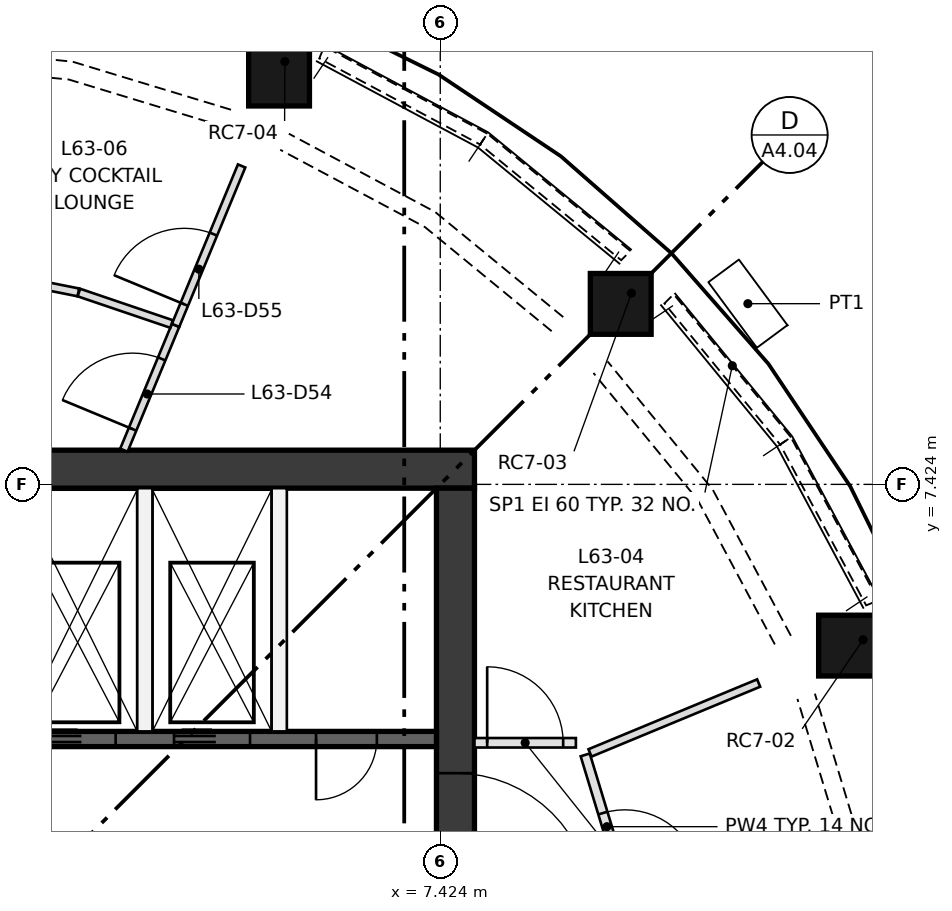
"""IFC4 building model, lengths in metres.
Left out: names, types, materials, properties, quantities, classifications, styles, units other than length and angle.
Written with IfcOpenShell. Run it as: python <this file> out.ifc"""

import sys

from ifc_helpers import new_model, si_unit, direction, frame, frame_2d, origin, origin_2d, place, context, subcontext, project, spatial, polyline, rectangle, outline, extrude, element, fill, save


model = new_model("IFC4")
c1 = context("Model", 3, precision=1e-05, world=origin(), true_north=direction((0.0, 1.0)))
c2 = subcontext(c1, "Body", "Model", "MODEL_VIEW")
j1 = project(units=[si_unit("LENGTHUNIT", "METRE"), si_unit("PLANEANGLEUNIT", "RADIAN")], contexts=[c1])
p1 = place(None, origin())
s1 = spatial("IfcSite", under=j1, at=p1, CompositionType="ELEMENT")
p2 = place(p1, origin())
s2 = spatial("IfcBuilding", under=s1, at=p2, CompositionType="ELEMENT")
p3 = place(p2, frame((0.0, 0.0, 231.2)))
s3 = spatial("IfcBuildingStorey", under=s2, at=p3, CompositionType="ELEMENT", Elevation=231.2)
p4 = place(p3, frame((12.987, 5.379, 0.5), z_axis=(0.0, 0.0, 1.0), x_axis=(0.382642651649, -0.923896423382, 0.0)))
e1 = element("IfcColumn", 1, at=p4, inside=s3, PredefinedType="COLUMN", context=c2, shape_type="SweptSolid", body=[
    extrude(rectangle(XDim=0.8, YDim=0.8, at=origin_2d()), origin(), (0.0, -0.275, 0.962), 3.328),
])
p5 = place(p3, frame((9.94, 9.94, 0.5), z_axis=(0.0, 0.0, 1.0), x_axis=(0.707106781187, -0.707106781187, 0.0)))
e2 = element("IfcColumn", 2, at=p5, inside=s3, PredefinedType="COLUMN", context=c2, shape_type="SweptSolid", body=[
    extrude(rectangle(XDim=0.8, YDim=0.8, at=origin_2d()), origin(), (0.0, -0.275, 0.962), 3.328),
])
p6 = place(p3, frame((5.379, 12.987, 0.5), z_axis=(0.0, 0.0, 1.0), x_axis=(0.923896423382, -0.382642651649, 0.0)))
e3 = element("IfcColumn", 3, at=p6, inside=s3, PredefinedType="COLUMN", context=c2, shape_type="SweptSolid", body=[
    extrude(rectangle(XDim=0.8, YDim=0.8, at=origin_2d()), origin(), (0.0, -0.275, 0.962), 3.328),
])
p7 = place(p3, frame((-7.874, 7.624, 0.0), z_axis=(0.0, 0.0, 1.0), x_axis=(1.0, 0.0, 0.0)))
e4 = element("IfcWall", 4, at=p7, inside=s3, PredefinedType="SHEAR", context=c2, shape_type="SweptSolid", body=[
    extrude(rectangle(XDim=15.748, YDim=0.5, at=frame_2d((7.874, 0.0))), origin(), (0.0, 0.0, 1.0), 3.3),
])
p8 = place(p3, frame((7.624, -7.374, 0.0), z_axis=(0.0, 0.0, 1.0), x_axis=(0.0, 1.0, 0.0)))
e5 = element("IfcWall", 5, at=p8, inside=s3, PredefinedType="SHEAR", context=c2, shape_type="SweptSolid", body=[
    extrude(rectangle(XDim=14.748, YDim=0.5, at=frame_2d((7.374, 0.0))), origin(), (0.0, 0.0, 1.0), 3.3),
])
p9 = place(p8, frame((6.874, 0.0, 0.0)))
e6 = element("IfcOpeningElement", 6, at=p9, cuts=e5, PredefinedType="OPENING", context=c2, shape_type="SweptSolid", body=[
    extrude(rectangle(XDim=1.0, YDim=2.1, at=frame_2d((0.5, 1.05))), frame((0.0, 0.26, 0.0), z_axis=(0.0, -1.0, 0.0), x_axis=(1.0, 0.0, 0.0)), (0.0, 0.0, 1.0), 0.52),
])
p10 = place(p8, frame((3.75, 0.0, 0.0)))
e7 = element("IfcOpeningElement", 7, at=p10, cuts=e5, PredefinedType="OPENING", context=c2, shape_type="SweptSolid", body=[
    extrude(rectangle(XDim=1.8, YDim=2.1, at=frame_2d((0.9, 1.05))), frame((0.0, 0.26, 0.0), z_axis=(0.0, -1.0, 0.0), x_axis=(1.0, 0.0, 0.0)), (0.0, 0.0, 1.0), 0.52),
])
p11 = place(p8, frame((9.198, 0.0, 0.0)))
e8 = element("IfcOpeningElement", 8, at=p11, cuts=e5, PredefinedType="OPENING", context=c2, shape_type="SweptSolid", body=[
    extrude(rectangle(XDim=1.8, YDim=2.1, at=frame_2d((0.9, 1.05))), frame((0.0, 0.26, 0.0), z_axis=(0.0, -1.0, 0.0), x_axis=(1.0, 0.0, 0.0)), (0.0, 0.0, 1.0), 0.52),
])
p12 = place(p3, frame((0.0, 4.074, 0.0), z_axis=(0.0, 0.0, 1.0), x_axis=(1.0, 0.0, 0.0)))
e9 = element("IfcWall", 9, at=p12, inside=s3, PredefinedType="SHEAR", context=c2, shape_type="SweptSolid", body=[
    extrude(rectangle(XDim=7.374, YDim=0.2, at=frame_2d((3.687, 0.0))), origin(), (0.0, 0.0, 1.0), 3.3),
])
p13 = place(p12, frame((0.384, 0.0, 0.0)))
e10 = element("IfcOpeningElement", 10, at=p13, cuts=e9, PredefinedType="OPENING", context=c2, shape_type="SweptSolid", body=[
    extrude(rectangle(XDim=1.0, YDim=2.1, at=frame_2d((0.5, 1.05))), frame((0.0, 0.11, 0.0), z_axis=(0.0, -1.0, 0.0), x_axis=(1.0, 0.0, 0.0)), (0.0, 0.0, 1.0), 0.22),
])
p14 = place(p12, frame((2.153, 0.0, 0.0)))
e11 = element("IfcOpeningElement", 11, at=p14, cuts=e9, PredefinedType="OPENING", context=c2, shape_type="SweptSolid", body=[
    extrude(rectangle(XDim=1.0, YDim=2.1, at=frame_2d((0.5, 1.05))), frame((0.0, 0.11, 0.0), z_axis=(0.0, -1.0, 0.0), x_axis=(1.0, 0.0, 0.0)), (0.0, 0.0, 1.0), 0.22),
])
p15 = place(p12, frame((3.921, 0.0, 0.0)))
e12 = element("IfcOpeningElement", 12, at=p15, cuts=e9, PredefinedType="OPENING", context=c2, shape_type="SweptSolid", body=[
    extrude(rectangle(XDim=1.0, YDim=2.1, at=frame_2d((0.5, 1.05))), frame((0.0, 0.11, 0.0), z_axis=(0.0, -1.0, 0.0), x_axis=(1.0, 0.0, 0.0)), (0.0, 0.0, 1.0), 0.22),
])
p16 = place(p12, frame((5.79, 0.0, 0.0)))
e13 = element("IfcOpeningElement", 13, at=p16, cuts=e9, PredefinedType="OPENING", context=c2, shape_type="SweptSolid", body=[
    extrude(rectangle(XDim=0.8, YDim=2.1, at=frame_2d((0.4, 1.05))), frame((0.0, 0.11, 0.0), z_axis=(0.0, -1.0, 0.0), x_axis=(1.0, 0.0, 0.0)), (0.0, 0.0, 1.0), 0.22),
])
for number, where, z_axis, x_axis in (
    (14, (3.537, 4.174, 0.0), (0.0, 0.0, 1.0), (0.0, 1.0, 0.0)),
    (15, (5.305, 4.174, 0.0), (0.0, 0.0, 1.0), (0.0, 1.0, 0.0)),
):
    element("IfcWall", number, at=place(p3, frame(where, z_axis=z_axis, x_axis=x_axis)), inside=s3, PredefinedType="PARTITIONING", context=c2, shape_type="SweptSolid", body=[
        extrude(rectangle(XDim=3.2, YDim=0.2, at=frame_2d((1.6, 0.0))), origin(), (0.0, 0.0, 1.0), 3.3),
    ])
p17 = place(p3, frame((14.2, 2.824, 0.0), z_axis=(0.894721380135, 0.271074750296, 0.354953703573), x_axis=(-0.289959608839, 0.957038883806, 1.1226683e-05)))
e16 = element("IfcWall", 16, at=p17, inside=s3, PredefinedType="SOLIDWALL", context=c2, shape_type="SweptSolid", body=[
    extrude(outline(polyline([(0.0, 0.0), (2.434, -5.551e-17), (2.417, 0.481), (0.017, 0.481), (0.0, 0.0)])), origin(), (0.0, 0.0, -1.0), 0.3),
])
p18 = place(p3, frame((13.186, 5.898, 0.0), z_axis=(0.824332600798, 0.441016524886, 0.35493687895), x_axis=(-0.471734377661, 0.881740708382, 1.0715603e-05)))
e17 = element("IfcWall", 17, at=p18, inside=s3, PredefinedType="SOLIDWALL", context=c2, shape_type="SweptSolid", body=[
    extrude(outline(polyline([(0.0, 0.0), (2.434, 0.0), (2.417, 0.481), (0.017, 0.481), (0.0, 0.0)])), origin(), (0.0, 0.0, -1.0), 0.3),
])
p19 = place(p3, frame((12.038, 8.044, 0.0), z_axis=(0.722862546463, 0.59284076781, 0.354978257002), x_axis=(-0.634136527431, 0.773221096766, -9.701072e-06)))
e18 = element("IfcWall", 18, at=p19, inside=s3, PredefinedType="SOLIDWALL", context=c2, shape_type="SweptSolid", body=[
    extrude(outline(polyline([(0.0, 0.0), (2.434, 5.551e-17), (2.417, 0.481), (0.017, 0.481), (0.0, 0.0)])), origin(), (0.0, 0.0, -1.0), 0.3),
])
p20 = place(p3, frame((9.926, 10.495, 0.0), z_axis=(0.59284076781, 0.722862546463, 0.354978257002), x_axis=(-0.773221096766, 0.634136527431, 9.701072e-06)))
e19 = element("IfcWall", 19, at=p20, inside=s3, PredefinedType="SOLIDWALL", context=c2, shape_type="SweptSolid", body=[
    extrude(outline(polyline([(0.0, 0.0), (2.434, -5.551e-17), (2.417, 0.481), (0.017, 0.481), (0.0, 0.0)])), origin(), (0.0, 0.0, -1.0), 0.3),
])
p21 = place(p3, frame((8.044, 12.038, 0.0), z_axis=(0.441126603603, 0.824402860411, 0.354636776631), x_axis=(-0.881712517728, 0.471787066311, 1.195964e-05)))
e20 = element("IfcWall", 20, at=p21, inside=s3, PredefinedType="SOLIDWALL", context=c2, shape_type="SweptSolid", body=[
    extrude(outline(polyline([(0.0, 0.0), (2.434, 5.551e-17), (2.417, 0.481), (0.017, 0.481), (0.0, 0.0)])), origin(), (0.0, 0.0, -1.0), 0.3),
])
p22 = place(p3, frame((5.154, 13.494, 0.0), z_axis=(0.271094631402, 0.894631168658, 0.355165838574), x_axis=(-0.957026634075, 0.290000037325, 4.815507e-06)))
e21 = element("IfcWall", 21, at=p22, inside=s3, PredefinedType="SOLIDWALL", context=c2, shape_type="SweptSolid", body=[
    extrude(outline(polyline([(0.0, 0.0), (2.434, 0.0), (2.417, 0.481), (0.017, 0.481), (0.0, 0.0)])), origin(), (0.0, 0.0, -1.0), 0.3),
])
p23 = place(p3, frame((9.331, 3.865, 0.0), z_axis=(0.0, 0.0, 1.0), x_axis=(0.290206520171, -0.956964040939, 0.0)))
e22 = element("IfcWall", 22, at=p23, inside=s3, PredefinedType="PARTITIONING", context=c2, shape_type="SweptSolid", body=[
    extrude(rectangle(XDim=1.974, YDim=0.125, at=frame_2d((0.987, 0.0))), origin(), (0.0, 0.0, 1.0), 3.3),
])
p24 = place(p23, frame((0.8, 0.0, 0.0)))
e23 = element("IfcOpeningElement", 23, at=p24, cuts=e22, PredefinedType="OPENING", context=c2, shape_type="SweptSolid", body=[
    extrude(rectangle(XDim=1.0, YDim=2.1, at=frame_2d((0.5, 1.05))), frame((0.0, 0.073, 0.0), z_axis=(0.0, -1.0, 0.0), x_axis=(1.0, 0.0, 0.0)), (0.0, 0.0, 1.0), 0.145),
])
p25 = place(p3, frame((7.874, 4.024, 0.0), z_axis=(0.0, 0.0, 1.0), x_axis=(1.0, 0.0, 0.0)))
e24 = element("IfcWall", 24, at=p25, inside=s3, PredefinedType="PARTITIONING", context=c2, shape_type="SweptSolid", body=[
    extrude(rectangle(XDim=1.334, YDim=0.125, at=frame_2d((0.667, 0.0))), origin(), (0.0, 0.0, 1.0), 3.3),
])
p26 = place(p25, frame((0.167, 0.0, 0.0)))
e25 = element("IfcOpeningElement", 25, at=p26, cuts=e24, PredefinedType="OPENING", context=c2, shape_type="SweptSolid", body=[
    extrude(rectangle(XDim=1.0, YDim=2.1, at=frame_2d((0.5, 1.05))), frame((0.0, 0.073, 0.0), z_axis=(0.0, -1.0, 0.0), x_axis=(1.0, 0.0, 0.0)), (0.0, 0.0, 1.0), 0.145),
])
p27 = place(p3, frame((9.394, 3.891, 0.0), z_axis=(0.0, 0.0, 1.0), x_axis=(0.923886765284, 0.38266597044, 0.0)))
e26 = element("IfcWall", 26, at=p27, inside=s3, PredefinedType="PARTITIONING", context=c2, shape_type="SweptSolid", body=[
    extrude(rectangle(XDim=2.402, YDim=0.105, at=frame_2d((1.201, 0.0))), origin(), (0.0, 0.0, 1.0), 3.3),
])
p28 = place(p3, frame((3.261, 7.874, 0.0), z_axis=(0.0, 0.0, 1.0), x_axis=(0.382683383062, 0.923879552933, 0.0)))
e27 = element("IfcWall", 27, at=p28, inside=s3, PredefinedType="PARTITIONING", context=c2, shape_type="SweptSolid", body=[
    extrude(rectangle(XDim=1.777, YDim=0.105, at=frame_2d((0.889, 0.0))), origin(), (0.0, 0.0, 1.0), 3.3),
])
p29 = place(p28, frame((0.3, 0.0, 0.0)))
e28 = element("IfcOpeningElement", 28, at=p29, cuts=e27, PredefinedType="OPENING", context=c2, shape_type="SweptSolid", body=[
    extrude(rectangle(XDim=1.0, YDim=2.1, at=frame_2d((0.5, 1.05))), frame((0.0, 0.062, 0.0), z_axis=(0.0, -1.0, 0.0), x_axis=(1.0, 0.0, 0.0)), (0.0, 0.0, 1.0), 0.125),
])
p30 = place(p3, frame((3.942, 9.516, 0.0), z_axis=(0.0, 0.0, 1.0), x_axis=(0.382674756939, 0.923883125943, 0.0)))
e29 = element("IfcWall", 29, at=p30, inside=s3, PredefinedType="PARTITIONING", context=c2, shape_type="SweptSolid", body=[
    extrude(rectangle(XDim=2.27, YDim=0.105, at=frame_2d((1.135, 0.0))), origin(), (0.0, 0.0, 1.0), 3.3),
])
p31 = place(p30, frame((0.3, 0.0, 0.0)))
e30 = element("IfcOpeningElement", 30, at=p31, cuts=e29, PredefinedType="OPENING", context=c2, shape_type="SweptSolid", body=[
    extrude(rectangle(XDim=1.0, YDim=2.1, at=frame_2d((0.5, 1.05))), frame((0.0, 0.062, 0.0), z_axis=(0.0, -1.0, 0.0), x_axis=(1.0, 0.0, 0.0)), (0.0, 0.0, 1.0), 0.125),
])
p32 = place(p3, frame((1.348, 10.211, 0.0), z_axis=(0.0, 0.0, 1.0), x_axis=(0.9807833349, -0.195100102466, 0.0)))
e31 = element("IfcWall", 31, at=p32, inside=s3, PredefinedType="PARTITIONING", context=c2, shape_type="SweptSolid", body=[
    extrude(rectangle(XDim=1.34, YDim=0.105, at=frame_2d((0.67, 0.0))), origin(), (0.0, 0.0, 1.0), 3.3),
])
p33 = place(p3, frame((2.669, 9.948, 0.0), z_axis=(0.0, 0.0, 1.0), x_axis=(0.946885945971, -0.321569596389, 0.0)))
e32 = element("IfcWall", 32, at=p33, inside=s3, PredefinedType="PARTITIONING", context=c2, shape_type="SweptSolid", body=[
    extrude(rectangle(XDim=1.288, YDim=0.105, at=frame_2d((0.644, 0.0))), origin(), (0.0, 0.0, 1.0), 3.3),
])
p34 = place(p14, frame((1.0, 0.0, 0.0), z_axis=(0.0, 0.0, 1.0), x_axis=(-1.0, 0.0, 0.0)))
e33 = element("IfcDoor", 33, at=p34, inside=s3, OperationType="DOUBLE_DOOR_SLIDING", PredefinedType="DOOR", context=c2, shape_type="SweptSolid", body=[
    extrude(rectangle(XDim=1.0, YDim=2.1, at=frame_2d((0.5, 1.05))), frame((0.0, 0.025, 0.0), z_axis=(0.0, -1.0, 0.0), x_axis=(1.0, 0.0, 0.0)), (0.0, 0.0, 1.0), 0.05),
])
fill(e11, e33)
p35 = place(p15, frame((1.0, 0.0, 0.0), z_axis=(0.0, 0.0, 1.0), x_axis=(-1.0, 0.0, 0.0)))
e34 = element("IfcDoor", 34, at=p35, inside=s3, OperationType="DOUBLE_DOOR_SLIDING", PredefinedType="DOOR", context=c2, shape_type="SweptSolid", body=[
    extrude(rectangle(XDim=1.0, YDim=2.1, at=frame_2d((0.5, 1.05))), frame((0.0, 0.025, 0.0), z_axis=(0.0, -1.0, 0.0), x_axis=(1.0, 0.0, 0.0)), (0.0, 0.0, 1.0), 0.05),
])
fill(e12, e34)
p36 = place(p16, frame((0.8, 0.0, 0.0), z_axis=(0.0, 0.0, 1.0), x_axis=(-1.0, 0.0, 0.0)))
e35 = element("IfcDoor", 35, at=p36, inside=s3, OperationType="SINGLE_SWING_LEFT", PredefinedType="DOOR", context=c2, shape_type="SweptSolid", body=[
    extrude(rectangle(XDim=0.8, YDim=2.1, at=frame_2d((0.4, 1.05))), frame((0.0, 0.025, 0.0), z_axis=(0.0, -1.0, 0.0), x_axis=(1.0, 0.0, 0.0)), (0.0, 0.0, 1.0), 0.05),
])
fill(e13, e35)
p37 = place(p11, frame((1.8, 0.0, 0.0), z_axis=(0.0, 0.0, 1.0), x_axis=(-1.0, 0.0, 0.0)))
e36 = element("IfcDoor", 36, at=p37, inside=s3, OperationType="DOUBLE_DOOR_SINGLE_SWING", PredefinedType="DOOR", context=c2, shape_type="SweptSolid", body=[
    extrude(rectangle(XDim=1.8, YDim=2.1, at=frame_2d((0.9, 1.05))), frame((0.0, 0.025, 0.0), z_axis=(0.0, -1.0, 0.0), x_axis=(1.0, 0.0, 0.0)), (0.0, 0.0, 1.0), 0.05),
])
fill(e8, e36)
p38 = place(p24, origin())
e37 = element("IfcDoor", 37, at=p38, inside=s3, OperationType="SINGLE_SWING_RIGHT", PredefinedType="DOOR", context=c2, shape_type="SweptSolid", body=[
    extrude(rectangle(XDim=1.0, YDim=2.1, at=frame_2d((0.5, 1.05))), frame((0.0, 0.025, 0.0), z_axis=(0.0, -1.0, 0.0), x_axis=(1.0, 0.0, 0.0)), (0.0, 0.0, 1.0), 0.05),
])
fill(e23, e37)
p39 = place(p26, origin())
e38 = element("IfcDoor", 38, at=p39, inside=s3, OperationType="SINGLE_SWING_LEFT", PredefinedType="DOOR", context=c2, shape_type="SweptSolid", body=[
    extrude(rectangle(XDim=1.0, YDim=2.1, at=frame_2d((0.5, 1.05))), frame((0.0, 0.025, 0.0), z_axis=(0.0, -1.0, 0.0), x_axis=(1.0, 0.0, 0.0)), (0.0, 0.0, 1.0), 0.05),
])
fill(e25, e38)
p40 = place(p29, origin())
e39 = element("IfcDoor", 39, at=p40, inside=s3, OperationType="SINGLE_SWING_LEFT", PredefinedType="DOOR", context=c2, shape_type="SweptSolid", body=[
    extrude(rectangle(XDim=1.0, YDim=2.1, at=frame_2d((0.5, 1.05))), frame((0.0, 0.025, 0.0), z_axis=(0.0, -1.0, 0.0), x_axis=(1.0, 0.0, 0.0)), (0.0, 0.0, 1.0), 0.05),
])
fill(e28, e39)
p41 = place(p31, origin())
e40 = element("IfcDoor", 40, at=p41, inside=s3, OperationType="SINGLE_SWING_LEFT", PredefinedType="DOOR", context=c2, shape_type="SweptSolid", body=[
    extrude(rectangle(XDim=1.0, YDim=2.1, at=frame_2d((0.5, 1.05))), frame((0.0, 0.025, 0.0), z_axis=(0.0, -1.0, 0.0), x_axis=(1.0, 0.0, 0.0)), (0.0, 0.0, 1.0), 0.05),
])
fill(e30, e40)
save(model, sys.argv[1])
